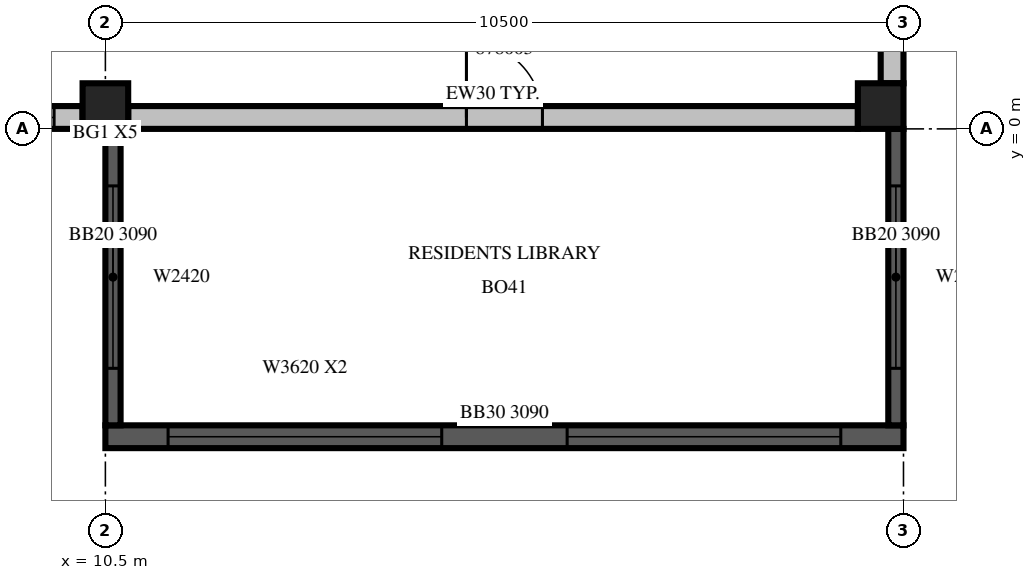
"""IFC4 building model, lengths in metres.
Left out: names, types, materials, properties, quantities, classifications, styles, units other than length and angle.
Written with IfcOpenShell. Run it as: python <this file> out.ifc"""

import sys

from ifc_helpers import new_model, si_unit, direction, frame, frame_2d, origin, origin_2d, place, context, subcontext, project, spatial, rectangle, extrude, source, transform, mapped, element, fill, save


model = new_model("IFC4")
c1 = context("Model", 3, precision=1e-05, world=origin(), true_north=direction((0.0, 1.0)))
c2 = subcontext(c1, "Body", "Model", "MODEL_VIEW")
j1 = project(units=[si_unit("LENGTHUNIT", "METRE"), si_unit("PLANEANGLEUNIT", "RADIAN")], contexts=[c1])
p1 = place(None, origin())
s1 = spatial("IfcSite", under=j1, at=p1, CompositionType="ELEMENT")
p2 = place(p1, origin())
s2 = spatial("IfcBuilding", under=s1, at=p2, CompositionType="ELEMENT")
p3 = place(p2, frame((0.0, 0.0, 333.5)))
s3 = spatial("IfcBuildingStorey", under=s2, at=p3, CompositionType="ELEMENT", Elevation=333.5)
m1 = source(origin(), c2, "Body", "SweptSolid", [
    extrude(rectangle(XDim=0.6, YDim=0.6, at=origin_2d()), origin(), (0.0, 0.0, 1.0), 3.5),
])
for number, where, z_axis, x_axis in (
    (1, (10.5, 0.3, 0.0), (0.0, 0.0, 1.0), (1.0, 0.0, 0.0)),
    (2, (20.7, 0.3, 0.0), (0.0, 0.0, 1.0), (1.0, 0.0, 0.0)),
):
    element("IfcColumn", number, at=place(p3, frame(where, z_axis=z_axis, x_axis=x_axis)), inside=s3, PredefinedType="COLUMN", context=c2, shape_type="MappedRepresentation", body=[
        mapped(m1, transform((0.0, 0.0, 0.0), scale=1.0)),
    ])
p4 = place(p3, frame((7.35, 0.15, 0.0), z_axis=(0.0, 0.0, 1.0), x_axis=(1.0, 0.0, 0.0)))
e3 = element("IfcWall", 3, at=p4, inside=s3, PredefinedType="STANDARD", context=c2, shape_type="SweptSolid", body=[
    extrude(rectangle(XDim=2.85, YDim=0.3, at=frame_2d((1.425, 0.0))), origin(), (0.0, 0.0, 1.0), 3.1),
])
m2 = source(origin(), c2, "Body", "SweptSolid", [
    extrude(rectangle(XDim=1.8, YDim=2.0, at=frame_2d((0.9, 1.0))), frame((0.0, 0.16, 0.0), z_axis=(0.0, -1.0, 0.0), x_axis=(1.0, 0.0, 0.0)), (0.0, 0.0, 1.0), 0.32),
])
p5 = place(p4, frame((0.675, 0.0, 0.6)))
e4 = element("IfcOpeningElement", 4, at=p5, cuts=e3, PredefinedType="OPENING", context=c2, shape_type="MappedRepresentation", body=[
    mapped(m2, transform((0.0, 0.0, 0.0), scale=1.0)),
])
m3 = source(origin(), c2, "Body", "SweptSolid", [
    extrude(rectangle(XDim=9.6, YDim=0.3, at=frame_2d((4.8, 0.0))), origin(), (0.0, 0.0, 1.0), 3.1),
])
p6 = place(p3, frame((10.8, 0.15, 0.0), z_axis=(0.0, 0.0, 1.0), x_axis=(1.0, 0.0, 0.0)))
e5 = element("IfcWall", 5, at=p6, inside=s3, PredefinedType="STANDARD", context=c2, shape_type="MappedRepresentation", body=[
    mapped(m3, transform((0.0, 0.0, 0.0), scale=1.0)),
])
m4 = source(origin(), c2, "Body", "SweptSolid", [
    extrude(rectangle(XDim=1.0, YDim=2.1, at=frame_2d((0.5, 1.05))), frame((0.0, 0.16, 0.0), z_axis=(0.0, -1.0, 0.0), x_axis=(1.0, 0.0, 0.0)), (0.0, 0.0, 1.0), 0.32),
])
p7 = place(p6, frame((4.45, 0.0, 0.0)))
e6 = element("IfcOpeningElement", 6, at=p7, cuts=e5, PredefinedType="OPENING", context=c2, shape_type="MappedRepresentation", body=[
    mapped(m4, transform((0.0, 0.0, 0.0), scale=1.0)),
])
m5 = source(origin(), c2, "Body", "SweptSolid", [
    extrude(rectangle(XDim=3.0, YDim=0.3, at=frame_2d((1.5, 0.0))), origin(), (0.0, 0.0, 1.0), 3.1),
])
p8 = place(p3, frame((20.85, 0.6, 0.0), z_axis=(0.0, 0.0, 1.0), x_axis=(0.0, 1.0, 0.0)))
e7 = element("IfcWall", 7, at=p8, inside=s3, PredefinedType="STANDARD", context=c2, shape_type="MappedRepresentation", body=[
    mapped(m5, transform((0.0, 0.0, 0.0), scale=1.0)),
])
m6 = source(origin(), c2, "Body", "SweptSolid", [
    extrude(rectangle(XDim=1.2, YDim=2.0, at=frame_2d((0.6, 1.0))), frame((0.0, 0.16, 0.0), z_axis=(0.0, -1.0, 0.0), x_axis=(1.0, 0.0, 0.0)), (0.0, 0.0, 1.0), 0.32),
])
p9 = place(p8, frame((1.425, 0.0, 0.6)))
e8 = element("IfcOpeningElement", 8, at=p9, cuts=e7, PredefinedType="OPENING", context=c2, shape_type="MappedRepresentation", body=[
    mapped(m6, transform((0.0, 0.0, 0.0), scale=1.0)),
])
p10 = place(p3, frame((10.5, -4.05, 0.0), z_axis=(0.0, 0.0, 1.0), x_axis=(1.0, 0.0, 0.0)))
e9 = element("IfcWall", 9, at=p10, inside=s3, PredefinedType="SOLIDWALL", context=c2, shape_type="SweptSolid", body=[
    extrude(rectangle(XDim=10.5, YDim=0.3, at=frame_2d((5.25, 0.0))), origin(), (0.0, 0.0, 1.0), 3.09),
])
m7 = source(origin(), c2, "Body", "SweptSolid", [
    extrude(rectangle(XDim=3.6, YDim=2.0, at=frame_2d((1.8, 1.0))), frame((0.0, 0.16, 0.0), z_axis=(0.0, -1.0, 0.0), x_axis=(1.0, 0.0, 0.0)), (0.0, 0.0, 1.0), 0.32),
])
p11 = place(p10, frame((0.825, 0.0, 0.6)))
e10 = element("IfcOpeningElement", 10, at=p11, cuts=e9, PredefinedType="OPENING", context=c2, shape_type="MappedRepresentation", body=[
    mapped(m7, transform((0.0, 0.0, 0.0), scale=1.0)),
])
p12 = place(p10, frame((6.075, 0.0, 0.6)))
e11 = element("IfcOpeningElement", 11, at=p12, cuts=e9, PredefinedType="OPENING", context=c2, shape_type="MappedRepresentation", body=[
    mapped(m7, transform((0.0, 0.0, 0.0), scale=1.0)),
])
m8 = source(origin(), c2, "Body", "SweptSolid", [
    extrude(rectangle(XDim=3.9, YDim=0.2, at=frame_2d((1.95, 0.0))), origin(), (0.0, 0.0, 1.0), 3.09),
])
p13 = place(p3, frame((10.6, 0.0, 0.0), z_axis=(0.0, 0.0, 1.0), x_axis=(0.0, -1.0, 0.0)))
e12 = element("IfcWall", 12, at=p13, inside=s3, PredefinedType="SOLIDWALL", context=c2, shape_type="MappedRepresentation", body=[
    mapped(m8, transform((0.0, 0.0, 0.0), scale=1.0)),
])
m9 = source(origin(), c2, "Body", "SweptSolid", [
    extrude(rectangle(XDim=2.4, YDim=2.0, at=frame_2d((1.2, 1.0))), frame((0.0, 0.11, 0.0), z_axis=(0.0, -1.0, 0.0), x_axis=(1.0, 0.0, 0.0)), (0.0, 0.0, 1.0), 0.22),
])
p14 = place(p13, frame((0.75, 0.0, 0.6)))
e13 = element("IfcOpeningElement", 13, at=p14, cuts=e12, PredefinedType="OPENING", context=c2, shape_type="MappedRepresentation", body=[
    mapped(m9, transform((0.0, 0.0, 0.0), scale=1.0)),
])
p15 = place(p3, frame((20.9, 0.0, 0.0), z_axis=(0.0, 0.0, 1.0), x_axis=(0.0, -1.0, 0.0)))
e14 = element("IfcWall", 14, at=p15, inside=s3, PredefinedType="SOLIDWALL", context=c2, shape_type="MappedRepresentation", body=[
    mapped(m8, transform((0.0, 0.0, 0.0), scale=1.0)),
])
p16 = place(p15, frame((0.75, 0.0, 0.6)))
e15 = element("IfcOpeningElement", 15, at=p16, cuts=e14, PredefinedType="OPENING", context=c2, shape_type="MappedRepresentation", body=[
    mapped(m9, transform((0.0, 0.0, 0.0), scale=1.0)),
])
m10 = source(origin(), c2, "Body", "SweptSolid", [
    extrude(rectangle(XDim=1.8, YDim=2.0, at=frame_2d((0.9, 1.0))), frame((0.0, 0.03, 0.0), z_axis=(0.0, -1.0, 0.0), x_axis=(1.0, 0.0, 0.0)), (0.0, 0.0, 1.0), 0.06),
])
p17 = place(p5, origin())
e16 = element("IfcWindow", 16, at=p17, inside=s3, PartitioningType="SINGLE_PANEL", PredefinedType="WINDOW", context=c2, shape_type="MappedRepresentation", body=[
    mapped(m10, transform((0.0, 0.0, 0.0), scale=1.0)),
])
fill(e4, e16)
m11 = source(origin(), c2, "Body", "SweptSolid", [
    extrude(rectangle(XDim=3.6, YDim=2.0, at=frame_2d((1.8, 1.0))), frame((0.0, 0.03, 0.0), z_axis=(0.0, -1.0, 0.0), x_axis=(1.0, 0.0, 0.0)), (0.0, 0.0, 1.0), 0.06),
])
p18 = place(p11, origin())
e17 = element("IfcWindow", 17, at=p18, inside=s3, PartitioningType="SINGLE_PANEL", PredefinedType="WINDOW", context=c2, shape_type="MappedRepresentation", body=[
    mapped(m11, transform((0.0, 0.0, 0.0), scale=1.0)),
])
fill(e10, e17)
p19 = place(p12, origin())
e18 = element("IfcWindow", 18, at=p19, inside=s3, PartitioningType="SINGLE_PANEL", PredefinedType="WINDOW", context=c2, shape_type="MappedRepresentation", body=[
    mapped(m11, transform((0.0, 0.0, 0.0), scale=1.0)),
])
fill(e11, e18)
m12 = source(origin(), c2, "Body", "SweptSolid", [
    extrude(rectangle(XDim=2.4, YDim=2.0, at=frame_2d((1.2, 1.0))), frame((0.0, 0.03, 0.0), z_axis=(0.0, -1.0, 0.0), x_axis=(1.0, 0.0, 0.0)), (0.0, 0.0, 1.0), 0.06),
])
p20 = place(p14, origin())
e19 = element("IfcWindow", 19, at=p20, inside=s3, PartitioningType="SINGLE_PANEL", PredefinedType="WINDOW", context=c2, shape_type="MappedRepresentation", body=[
    mapped(m12, transform((0.0, 0.0, 0.0), scale=1.0)),
])
fill(e13, e19)
p21 = place(p16, origin())
e20 = element("IfcWindow", 20, at=p21, inside=s3, PartitioningType="SINGLE_PANEL", PredefinedType="WINDOW", context=c2, shape_type="MappedRepresentation", body=[
    mapped(m12, transform((0.0, 0.0, 0.0), scale=1.0)),
])
fill(e15, e20)
m13 = source(origin(), c2, "Body", "SweptSolid", [
    extrude(rectangle(XDim=1.0, YDim=2.1, at=frame_2d((0.5, 1.05))), frame((0.0, 0.025, 0.0), z_axis=(0.0, -1.0, 0.0), x_axis=(1.0, 0.0, 0.0)), (0.0, 0.0, 1.0), 0.05),
])
p22 = place(p7, origin())
e21 = element("IfcDoor", 21, at=p22, inside=s3, OperationType="SINGLE_SWING_LEFT", PredefinedType="DOOR", context=c2, shape_type="MappedRepresentation", body=[
    mapped(m13, transform((0.0, 0.0, 0.0), scale=1.0)),
])
fill(e6, e21)
save(model, sys.argv[1])
